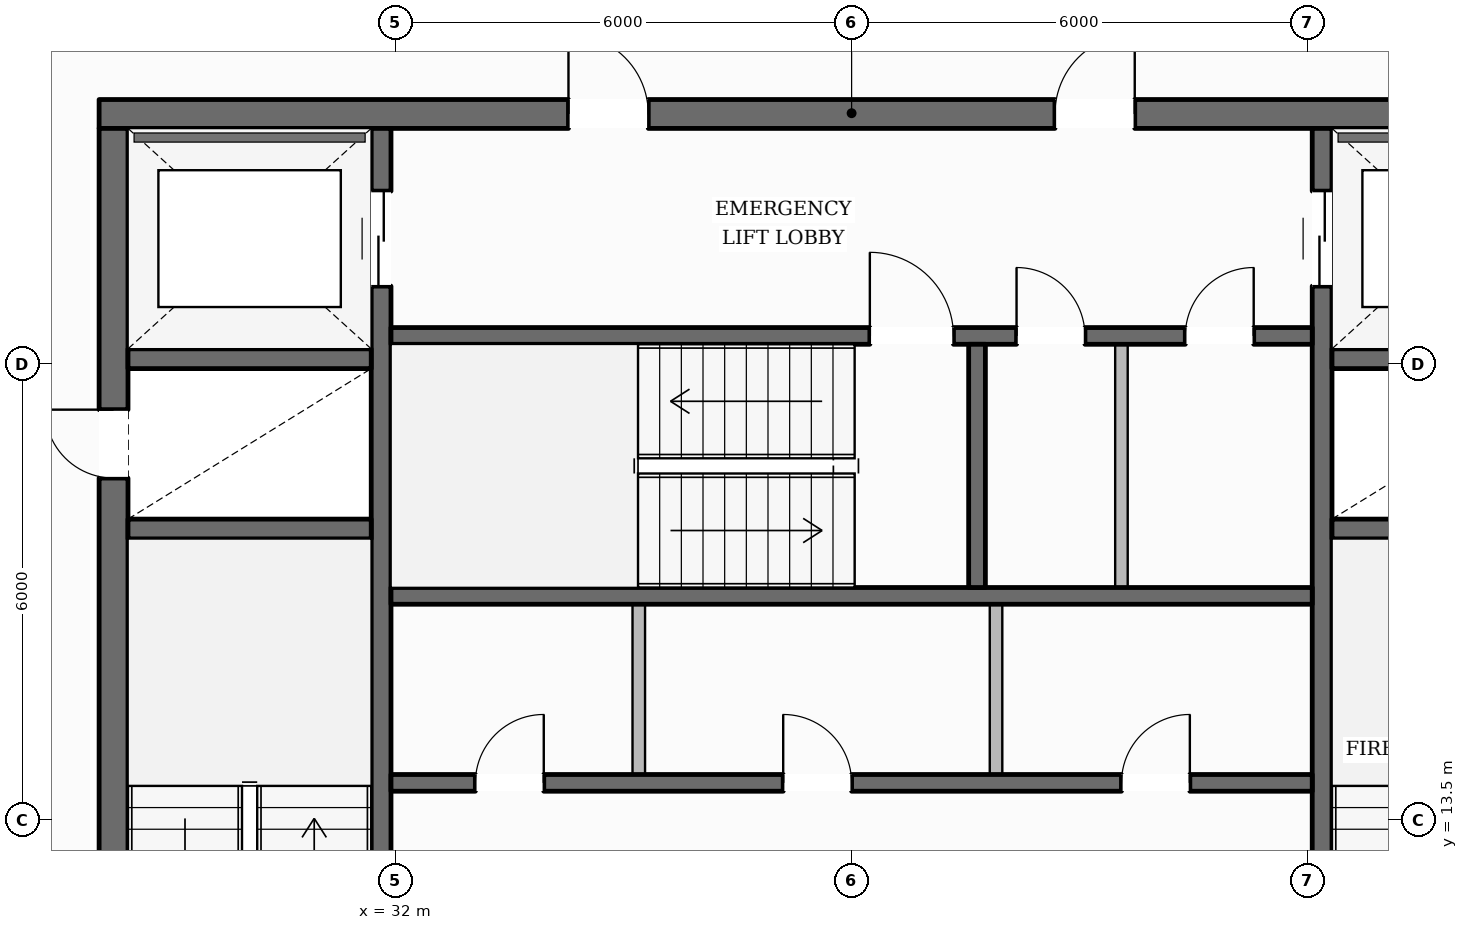
"""IFC4 building model, lengths in metres.
Left out: names, types, materials, properties, quantities, classifications, styles, units other than length and angle.
Written with IfcOpenShell. Run it as: python <this file> out.ifc"""

import sys

from ifc_helpers import new_model, si_unit, direction, frame, frame_2d, origin, place, context, subcontext, project, spatial, rectangle, extrude, element, fill, save


model = new_model("IFC4")
c1 = context("Model", 3, precision=1e-05, world=origin(), true_north=direction((0.0, 1.0)))
c2 = subcontext(c1, "Body", "Model", "MODEL_VIEW")
j1 = project(units=[si_unit("LENGTHUNIT", "METRE"), si_unit("PLANEANGLEUNIT", "RADIAN")], contexts=[c1])
p1 = place(None, origin())
s1 = spatial("IfcSite", under=j1, at=p1, CompositionType="ELEMENT")
p2 = place(p1, origin())
s2 = spatial("IfcBuilding", under=s1, at=p2, CompositionType="ELEMENT")
p3 = place(p2, frame((0.0, 0.0, 266.45)))
s3 = spatial("IfcBuildingStorey", under=s2, at=p3, CompositionType="ELEMENT", Elevation=266.45)
p4 = place(p3, frame((28.1, 22.79, 0.0), z_axis=(0.0, 0.0, 1.0), x_axis=(1.0, 0.0, 0.0)))
e1 = element("IfcWall", 1, at=p4, inside=s3, PredefinedType="SOLIDWALL", context=c2, shape_type="SweptSolid", body=[
    extrude(rectangle(XDim=19.8, YDim=0.38, at=frame_2d((9.9, 0.0))), origin(), (0.0, 0.0, 1.0), 3.61),
])
p5 = place(p4, frame((6.175, 0.0, 0.0)))
e2 = element("IfcOpeningElement", 2, at=p5, cuts=e1, PredefinedType="OPENING", context=c2, shape_type="SweptSolid", body=[
    extrude(rectangle(XDim=1.05, YDim=2.15, at=frame_2d((0.525, 1.075))), frame((0.0, 0.2, 0.0), z_axis=(0.0, -1.0, 0.0), x_axis=(1.0, 0.0, 0.0)), (0.0, 0.0, 1.0), 0.4),
])
p6 = place(p4, frame((12.575, 0.0, 0.0)))
e3 = element("IfcOpeningElement", 3, at=p6, cuts=e1, PredefinedType="OPENING", context=c2, shape_type="SweptSolid", body=[
    extrude(rectangle(XDim=1.05, YDim=2.15, at=frame_2d((0.525, 1.075))), frame((0.0, 0.2, 0.0), z_axis=(0.0, -1.0, 0.0), x_axis=(1.0, 0.0, 0.0)), (0.0, 0.0, 1.0), 0.4),
])
p7 = place(p3, frame((28.29, 9.6, 0.0), z_axis=(0.0, 0.0, 1.0), x_axis=(0.0, 1.0, 0.0)))
e4 = element("IfcWall", 4, at=p7, inside=s3, PredefinedType="SOLIDWALL", context=c2, shape_type="SweptSolid", body=[
    extrude(rectangle(XDim=13.0, YDim=0.38, at=frame_2d((6.5, 0.0))), origin(), (0.0, 0.0, 1.0), 3.61),
])
p8 = place(p7, frame((0.2, 0.0, 0.0)))
e5 = element("IfcOpeningElement", 5, at=p8, cuts=e4, PredefinedType="OPENING", context=c2, shape_type="SweptSolid", body=[
    extrude(rectangle(XDim=1.1, YDim=2.15, at=frame_2d((0.55, 1.075))), frame((0.0, 0.2, 0.0), z_axis=(0.0, -1.0, 0.0), x_axis=(1.0, 0.0, 0.0)), (0.0, 0.0, 1.0), 0.4),
])
p9 = place(p7, frame((8.4, 0.0, 0.0)))
e6 = element("IfcOpeningElement", 6, at=p9, cuts=e4, PredefinedType="OPENING", context=c2, shape_type="SweptSolid", body=[
    extrude(rectangle(XDim=0.9, YDim=2.1, at=frame_2d((0.45, 1.05))), frame((0.0, 0.2, 0.0), z_axis=(0.0, -1.0, 0.0), x_axis=(1.0, 0.0, 0.0)), (0.0, 0.0, 1.0), 0.4),
])
p10 = place(p3, frame((31.81, 9.6, 0.0), z_axis=(0.0, 0.0, 1.0), x_axis=(0.0, 1.0, 0.0)))
e7 = element("IfcWall", 7, at=p10, inside=s3, PredefinedType="SHEAR", context=c2, shape_type="SweptSolid", body=[
    extrude(rectangle(XDim=13.0, YDim=0.26, at=frame_2d((6.5, 0.0))), origin(), (0.0, 0.0, 1.0), 3.61),
])
p11 = place(p10, frame((10.925, 0.0, 0.0)))
e8 = element("IfcOpeningElement", 8, at=p11, cuts=e7, PredefinedType="OPENING", context=c2, shape_type="SweptSolid", body=[
    extrude(rectangle(XDim=1.25, YDim=2.25, at=frame_2d((0.625, 1.125))), frame((0.0, 0.14, 0.0), z_axis=(0.0, -1.0, 0.0), x_axis=(1.0, 0.0, 0.0)), (0.0, 0.0, 1.0), 0.28),
])
p12 = place(p3, frame((44.19, 9.6, 0.0), z_axis=(0.0, 0.0, 1.0), x_axis=(0.0, 1.0, 0.0)))
e9 = element("IfcWall", 9, at=p12, inside=s3, PredefinedType="SHEAR", context=c2, shape_type="SweptSolid", body=[
    extrude(rectangle(XDim=13.0, YDim=0.26, at=frame_2d((6.5, 0.0))), origin(), (0.0, 0.0, 1.0), 3.61),
])
p13 = place(p12, frame((10.925, 0.0, 0.0)))
e10 = element("IfcOpeningElement", 10, at=p13, cuts=e9, PredefinedType="OPENING", context=c2, shape_type="SweptSolid", body=[
    extrude(rectangle(XDim=1.25, YDim=2.25, at=frame_2d((0.625, 1.125))), frame((0.0, 0.14, 0.0), z_axis=(0.0, -1.0, 0.0), x_axis=(1.0, 0.0, 0.0)), (0.0, 0.0, 1.0), 0.28),
])
for number, where, z_axis, x_axis in (
    (11, (28.48, 17.33, 0.0), (0.0, 0.0, 1.0), (1.0, 0.0, 0.0)),
    (12, (28.48, 19.57, 0.0), (0.0, 0.0, 1.0), (1.0, 0.0, 0.0)),
    (13, (44.32, 17.33, 0.0), (0.0, 0.0, 1.0), (1.0, 0.0, 0.0)),
    (14, (44.32, 19.57, 0.0), (0.0, 0.0, 1.0), (1.0, 0.0, 0.0)),
):
    element("IfcWall", number, at=place(p3, frame(where, z_axis=z_axis, x_axis=x_axis)), inside=s3, PredefinedType="SHEAR", context=c2, shape_type="SweptSolid", body=[
        extrude(rectangle(XDim=3.2, YDim=0.26, at=frame_2d((1.6, 0.0))), origin(), (0.0, 0.0, 1.0), 3.61),
    ])
p14 = place(p3, frame((31.94, 19.87, 0.0), z_axis=(0.0, 0.0, 1.0), x_axis=(1.0, 0.0, 0.0)))
e15 = element("IfcWall", 15, at=p14, inside=s3, PredefinedType="SOLIDWALL", context=c2, shape_type="SweptSolid", body=[
    extrude(rectangle(XDim=12.12, YDim=0.22, at=frame_2d((6.06, 0.0))), origin(), (0.0, 0.0, 1.0), 3.61),
])
p15 = place(p14, frame((6.3, 0.0, 0.0)))
e16 = element("IfcOpeningElement", 16, at=p15, cuts=e15, PredefinedType="OPENING", context=c2, shape_type="SweptSolid", body=[
    extrude(rectangle(XDim=1.1, YDim=2.15, at=frame_2d((0.55, 1.075))), frame((0.0, 0.12, 0.0), z_axis=(0.0, -1.0, 0.0), x_axis=(1.0, 0.0, 0.0)), (0.0, 0.0, 1.0), 0.24),
])
p16 = place(p14, frame((8.23, 0.0, 0.0)))
e17 = element("IfcOpeningElement", 17, at=p16, cuts=e15, PredefinedType="OPENING", context=c2, shape_type="SweptSolid", body=[
    extrude(rectangle(XDim=0.9, YDim=2.1, at=frame_2d((0.45, 1.05))), frame((0.0, 0.12, 0.0), z_axis=(0.0, -1.0, 0.0), x_axis=(1.0, 0.0, 0.0)), (0.0, 0.0, 1.0), 0.24),
])
p17 = place(p14, frame((10.45, 0.0, 0.0)))
e18 = element("IfcOpeningElement", 18, at=p17, cuts=e15, PredefinedType="OPENING", context=c2, shape_type="SweptSolid", body=[
    extrude(rectangle(XDim=0.9, YDim=2.1, at=frame_2d((0.45, 1.05))), frame((0.0, 0.12, 0.0), z_axis=(0.0, -1.0, 0.0), x_axis=(1.0, 0.0, 0.0)), (0.0, 0.0, 1.0), 0.24),
])
p18 = place(p3, frame((31.94, 16.45, 0.0), z_axis=(0.0, 0.0, 1.0), x_axis=(1.0, 0.0, 0.0)))
e19 = element("IfcWall", 19, at=p18, inside=s3, PredefinedType="SOLIDWALL", context=c2, shape_type="SweptSolid", body=[
    extrude(rectangle(XDim=12.12, YDim=0.22, at=frame_2d((6.06, 0.0))), origin(), (0.0, 0.0, 1.0), 3.61),
])
p19 = place(p3, frame((39.65, 16.56, 0.0), z_axis=(0.0, 0.0, 1.0), x_axis=(0.0, 1.0, 0.0)))
e20 = element("IfcWall", 20, at=p19, inside=s3, PredefinedType="SOLIDWALL", context=c2, shape_type="SweptSolid", body=[
    extrude(rectangle(XDim=3.2, YDim=0.22, at=frame_2d((1.6, 0.0))), origin(), (0.0, 0.0, 1.0), 3.61),
])
p20 = place(p3, frame((31.94, 13.99, 0.0), z_axis=(0.0, 0.0, 1.0), x_axis=(1.0, 0.0, 0.0)))
e21 = element("IfcWall", 21, at=p20, inside=s3, PredefinedType="SOLIDWALL", context=c2, shape_type="SweptSolid", body=[
    extrude(rectangle(XDim=12.12, YDim=0.22, at=frame_2d((6.06, 0.0))), origin(), (0.0, 0.0, 1.0), 3.61),
])
p21 = place(p20, frame((1.11, 0.0, 0.0)))
e22 = element("IfcOpeningElement", 22, at=p21, cuts=e21, PredefinedType="OPENING", context=c2, shape_type="SweptSolid", body=[
    extrude(rectangle(XDim=0.9, YDim=2.1, at=frame_2d((0.45, 1.05))), frame((0.0, 0.12, 0.0), z_axis=(0.0, -1.0, 0.0), x_axis=(1.0, 0.0, 0.0)), (0.0, 0.0, 1.0), 0.24),
])
p22 = place(p20, frame((5.16, 0.0, 0.0)))
e23 = element("IfcOpeningElement", 23, at=p22, cuts=e21, PredefinedType="OPENING", context=c2, shape_type="SweptSolid", body=[
    extrude(rectangle(XDim=0.9, YDim=2.1, at=frame_2d((0.45, 1.05))), frame((0.0, 0.12, 0.0), z_axis=(0.0, -1.0, 0.0), x_axis=(1.0, 0.0, 0.0)), (0.0, 0.0, 1.0), 0.24),
])
p23 = place(p20, frame((9.61, 0.0, 0.0)))
e24 = element("IfcOpeningElement", 24, at=p23, cuts=e21, PredefinedType="OPENING", context=c2, shape_type="SweptSolid", body=[
    extrude(rectangle(XDim=0.9, YDim=2.1, at=frame_2d((0.45, 1.05))), frame((0.0, 0.12, 0.0), z_axis=(0.0, -1.0, 0.0), x_axis=(1.0, 0.0, 0.0)), (0.0, 0.0, 1.0), 0.24),
])
p24 = place(p3, frame((15.894, 10.745, 0.0), z_axis=(0.0, 0.0, 1.0), x_axis=(0.502581466224, 0.864529854781, 0.0)))
e25 = element("IfcWall", 25, at=p24, inside=s3, PredefinedType="STANDARD", context=c2, shape_type="SweptSolid", body=[
    extrude(rectangle(XDim=37.873, YDim=0.35, at=frame_2d((18.937, 0.0))), origin(), (0.0, 0.0, 1.0), 3.196),
])
p25 = place(p24, frame((33.643, 0.0, 0.65)))
e26 = element("IfcOpeningElement", 26, at=p25, cuts=e25, PredefinedType="OPENING", context=c2, shape_type="SweptSolid", body=[
    extrude(rectangle(XDim=1.35, YDim=1.75, at=frame_2d((0.675, 0.875))), frame((0.0, 0.185, 0.0), z_axis=(0.0, -1.0, 0.0), x_axis=(1.0, 0.0, 0.0)), (0.0, 0.0, 1.0), 0.37),
])
p26 = place(p24, frame((27.491, 0.0, 0.65)))
e27 = element("IfcOpeningElement", 27, at=p26, cuts=e25, PredefinedType="OPENING", context=c2, shape_type="SweptSolid", body=[
    extrude(rectangle(XDim=1.35, YDim=1.75, at=frame_2d((0.675, 0.875))), frame((0.0, 0.185, 0.0), z_axis=(0.0, -1.0, 0.0), x_axis=(1.0, 0.0, 0.0)), (0.0, 0.0, 1.0), 0.37),
])
p27 = place(p24, frame((15.187, 0.0, 0.65)))
e28 = element("IfcOpeningElement", 28, at=p27, cuts=e25, PredefinedType="OPENING", context=c2, shape_type="SweptSolid", body=[
    extrude(rectangle(XDim=1.35, YDim=1.75, at=frame_2d((0.675, 0.875))), frame((0.0, 0.185, 0.0), z_axis=(0.0, -1.0, 0.0), x_axis=(1.0, 0.0, 0.0)), (0.0, 0.0, 1.0), 0.37),
])
p28 = place(p24, frame((9.035, 0.0, 0.65)))
e29 = element("IfcOpeningElement", 29, at=p28, cuts=e25, PredefinedType="OPENING", context=c2, shape_type="SweptSolid", body=[
    extrude(rectangle(XDim=1.35, YDim=1.75, at=frame_2d((0.675, 0.875))), frame((0.0, 0.185, 0.0), z_axis=(0.0, -1.0, 0.0), x_axis=(1.0, 0.0, 0.0)), (0.0, 0.0, 1.0), 0.37),
])
p29 = place(p24, frame((2.883, 0.0, 0.65)))
e30 = element("IfcOpeningElement", 30, at=p29, cuts=e25, PredefinedType="OPENING", context=c2, shape_type="SweptSolid", body=[
    extrude(rectangle(XDim=1.35, YDim=1.75, at=frame_2d((0.675, 0.875))), frame((0.0, 0.185, 0.0), z_axis=(0.0, -1.0, 0.0), x_axis=(1.0, 0.0, 0.0)), (0.0, 0.0, 1.0), 0.37),
])
p30 = place(p3, frame((41.166, 43.431, 0.0), z_axis=(0.0, 0.0, 1.0), x_axis=(0.50946847144, -0.860489323936, 0.0)))
e31 = element("IfcWall", 31, at=p30, inside=s3, PredefinedType="STANDARD", context=c2, shape_type="SweptSolid", body=[
    extrude(rectangle(XDim=38.404, YDim=0.35, at=frame_2d((19.202, 0.0))), origin(), (0.0, 0.0, 1.0), 3.196),
])
p31 = place(p30, frame((34.126, 0.0, 0.65)))
e32 = element("IfcOpeningElement", 32, at=p31, cuts=e31, PredefinedType="OPENING", context=c2, shape_type="SweptSolid", body=[
    extrude(rectangle(XDim=1.35, YDim=1.75, at=frame_2d((0.675, 0.875))), frame((0.0, 0.185, 0.0), z_axis=(0.0, -1.0, 0.0), x_axis=(1.0, 0.0, 0.0)), (0.0, 0.0, 1.0), 0.37),
])
p32 = place(p30, frame((27.884, 0.0, 0.65)))
e33 = element("IfcOpeningElement", 33, at=p32, cuts=e31, PredefinedType="OPENING", context=c2, shape_type="SweptSolid", body=[
    extrude(rectangle(XDim=1.35, YDim=1.75, at=frame_2d((0.675, 0.875))), frame((0.0, 0.185, 0.0), z_axis=(0.0, -1.0, 0.0), x_axis=(1.0, 0.0, 0.0)), (0.0, 0.0, 1.0), 0.37),
])
p33 = place(p30, frame((15.401, 0.0, 0.65)))
e34 = element("IfcOpeningElement", 34, at=p33, cuts=e31, PredefinedType="OPENING", context=c2, shape_type="SweptSolid", body=[
    extrude(rectangle(XDim=1.35, YDim=1.75, at=frame_2d((0.675, 0.875))), frame((0.0, 0.185, 0.0), z_axis=(0.0, -1.0, 0.0), x_axis=(1.0, 0.0, 0.0)), (0.0, 0.0, 1.0), 0.37),
])
p34 = place(p30, frame((9.159, 0.0, 0.65)))
e35 = element("IfcOpeningElement", 35, at=p34, cuts=e31, PredefinedType="OPENING", context=c2, shape_type="SweptSolid", body=[
    extrude(rectangle(XDim=1.35, YDim=1.75, at=frame_2d((0.675, 0.875))), frame((0.0, 0.185, 0.0), z_axis=(0.0, -1.0, 0.0), x_axis=(1.0, 0.0, 0.0)), (0.0, 0.0, 1.0), 0.37),
])
p35 = place(p30, frame((2.917, 0.0, 0.65)))
e36 = element("IfcOpeningElement", 36, at=p35, cuts=e31, PredefinedType="OPENING", context=c2, shape_type="SweptSolid", body=[
    extrude(rectangle(XDim=1.35, YDim=1.75, at=frame_2d((0.675, 0.875))), frame((0.0, 0.185, 0.0), z_axis=(0.0, -1.0, 0.0), x_axis=(1.0, 0.0, 0.0)), (0.0, 0.0, 1.0), 0.37),
])
for number, where, z_axis, x_axis in (
    (37, (35.2, 14.1, 0.0), (0.0, 0.0, 1.0), (0.0, 1.0, 0.0)),
    (38, (39.9, 14.1, 0.0), (0.0, 0.0, 1.0), (0.0, 1.0, 0.0)),
):
    element("IfcWall", number, at=place(p3, frame(where, z_axis=z_axis, x_axis=x_axis)), inside=s3, PredefinedType="PARTITIONING", context=c2, shape_type="SweptSolid", body=[
        extrude(rectangle(XDim=2.24, YDim=0.165, at=frame_2d((1.12, 0.0))), origin(), (0.0, 0.0, 1.0), 3.61),
    ])
p36 = place(p3, frame((41.55, 16.56, 0.0), z_axis=(0.0, 0.0, 1.0), x_axis=(0.0, 1.0, 0.0)))
e39 = element("IfcWall", 39, at=p36, inside=s3, PredefinedType="PARTITIONING", context=c2, shape_type="SweptSolid", body=[
    extrude(rectangle(XDim=3.2, YDim=0.165, at=frame_2d((1.6, 0.0))), origin(), (0.0, 0.0, 1.0), 3.61),
])
p37 = place(p15, origin())
e40 = element("IfcDoor", 40, at=p37, inside=s3, OperationType="SINGLE_SWING_LEFT", PredefinedType="DOOR", context=c2, shape_type="SweptSolid", body=[
    extrude(rectangle(XDim=1.1, YDim=2.15, at=frame_2d((0.55, 1.075))), frame((0.0, 0.025, 0.0), z_axis=(0.0, -1.0, 0.0), x_axis=(1.0, 0.0, 0.0)), (0.0, 0.0, 1.0), 0.05),
])
fill(e16, e40)
p38 = place(p9, origin())
e41 = element("IfcDoor", 41, at=p38, inside=s3, OperationType="SINGLE_SWING_RIGHT", PredefinedType="DOOR", context=c2, shape_type="SweptSolid", body=[
    extrude(rectangle(XDim=0.9, YDim=2.1, at=frame_2d((0.45, 1.05))), frame((0.0, 0.025, 0.0), z_axis=(0.0, -1.0, 0.0), x_axis=(1.0, 0.0, 0.0)), (0.0, 0.0, 1.0), 0.05),
])
fill(e6, e41)
p39 = place(p5, origin())
e42 = element("IfcDoor", 42, at=p39, inside=s3, OperationType="SINGLE_SWING_LEFT", PredefinedType="DOOR", context=c2, shape_type="SweptSolid", body=[
    extrude(rectangle(XDim=1.05, YDim=2.15, at=frame_2d((0.525, 1.075))), frame((0.0, 0.025, 0.0), z_axis=(0.0, -1.0, 0.0), x_axis=(1.0, 0.0, 0.0)), (0.0, 0.0, 1.0), 0.05),
])
fill(e2, e42)
p40 = place(p6, origin())
e43 = element("IfcDoor", 43, at=p40, inside=s3, OperationType="SINGLE_SWING_RIGHT", PredefinedType="DOOR", context=c2, shape_type="SweptSolid", body=[
    extrude(rectangle(XDim=1.05, YDim=2.15, at=frame_2d((0.525, 1.075))), frame((0.0, 0.025, 0.0), z_axis=(0.0, -1.0, 0.0), x_axis=(1.0, 0.0, 0.0)), (0.0, 0.0, 1.0), 0.05),
])
fill(e3, e43)
p41 = place(p11, origin())
e44 = element("IfcDoor", 44, at=p41, inside=s3, OperationType="DOUBLE_DOOR_SLIDING", PredefinedType="DOOR", context=c2, shape_type="SweptSolid", body=[
    extrude(rectangle(XDim=1.25, YDim=2.25, at=frame_2d((0.625, 1.125))), frame((0.0, 0.025, 0.0), z_axis=(0.0, -1.0, 0.0), x_axis=(1.0, 0.0, 0.0)), (0.0, 0.0, 1.0), 0.05),
])
fill(e8, e44)
p42 = place(p13, origin())
e45 = element("IfcDoor", 45, at=p42, inside=s3, OperationType="DOUBLE_DOOR_SLIDING", PredefinedType="DOOR", context=c2, shape_type="SweptSolid", body=[
    extrude(rectangle(XDim=1.25, YDim=2.25, at=frame_2d((0.625, 1.125))), frame((0.0, 0.025, 0.0), z_axis=(0.0, -1.0, 0.0), x_axis=(1.0, 0.0, 0.0)), (0.0, 0.0, 1.0), 0.05),
])
fill(e10, e45)
p43 = place(p21, origin())
e46 = element("IfcDoor", 46, at=p43, inside=s3, OperationType="SINGLE_SWING_RIGHT", PredefinedType="DOOR", context=c2, shape_type="SweptSolid", body=[
    extrude(rectangle(XDim=0.9, YDim=2.1, at=frame_2d((0.45, 1.05))), frame((0.0, 0.025, 0.0), z_axis=(0.0, -1.0, 0.0), x_axis=(1.0, 0.0, 0.0)), (0.0, 0.0, 1.0), 0.05),
])
fill(e22, e46)
p44 = place(p22, origin())
e47 = element("IfcDoor", 47, at=p44, inside=s3, OperationType="SINGLE_SWING_LEFT", PredefinedType="DOOR", context=c2, shape_type="SweptSolid", body=[
    extrude(rectangle(XDim=0.9, YDim=2.1, at=frame_2d((0.45, 1.05))), frame((0.0, 0.025, 0.0), z_axis=(0.0, -1.0, 0.0), x_axis=(1.0, 0.0, 0.0)), (0.0, 0.0, 1.0), 0.05),
])
fill(e23, e47)
p45 = place(p23, origin())
e48 = element("IfcDoor", 48, at=p45, inside=s3, OperationType="SINGLE_SWING_RIGHT", PredefinedType="DOOR", context=c2, shape_type="SweptSolid", body=[
    extrude(rectangle(XDim=0.9, YDim=2.1, at=frame_2d((0.45, 1.05))), frame((0.0, 0.025, 0.0), z_axis=(0.0, -1.0, 0.0), x_axis=(1.0, 0.0, 0.0)), (0.0, 0.0, 1.0), 0.05),
])
fill(e24, e48)
p46 = place(p16, origin())
e49 = element("IfcDoor", 49, at=p46, inside=s3, OperationType="SINGLE_SWING_LEFT", PredefinedType="DOOR", context=c2, shape_type="SweptSolid", body=[
    extrude(rectangle(XDim=0.9, YDim=2.1, at=frame_2d((0.45, 1.05))), frame((0.0, 0.025, 0.0), z_axis=(0.0, -1.0, 0.0), x_axis=(1.0, 0.0, 0.0)), (0.0, 0.0, 1.0), 0.05),
])
fill(e17, e49)
p47 = place(p17, origin())
e50 = element("IfcDoor", 50, at=p47, inside=s3, OperationType="SINGLE_SWING_RIGHT", PredefinedType="DOOR", context=c2, shape_type="SweptSolid", body=[
    extrude(rectangle(XDim=0.9, YDim=2.1, at=frame_2d((0.45, 1.05))), frame((0.0, 0.025, 0.0), z_axis=(0.0, -1.0, 0.0), x_axis=(1.0, 0.0, 0.0)), (0.0, 0.0, 1.0), 0.05),
])
fill(e18, e50)
save(model, sys.argv[1])
